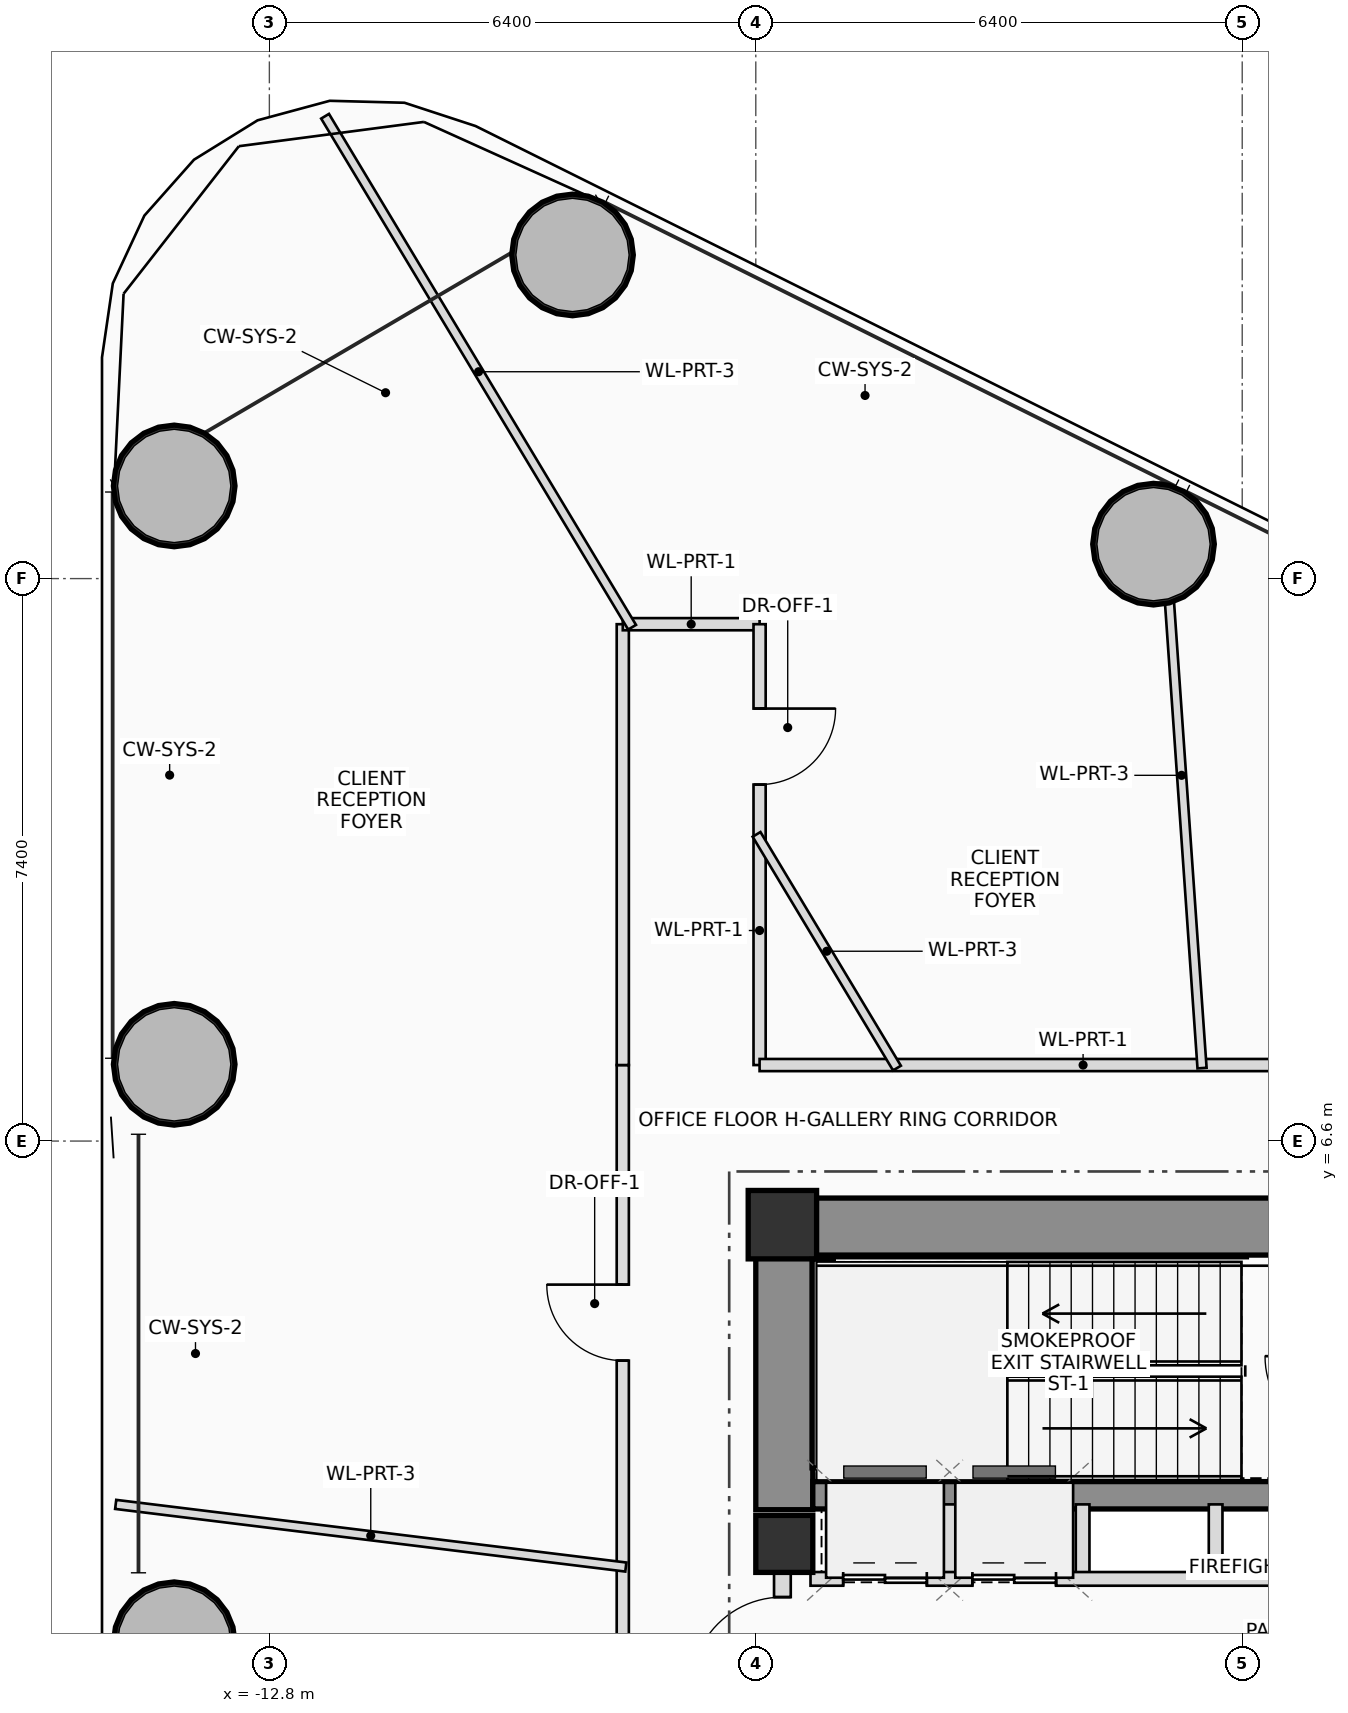
"""IFC4 building model, lengths in metres.
Left out: names, types, materials, properties, quantities, classifications, styles, units other than length and angle.
Written with IfcOpenShell. Run it as: python <this file> out.ifc"""

import sys

from ifc_helpers import new_model, si_unit, direction, frame, frame_2d, origin, origin_2d, place, context, subcontext, project, spatial, rectangle, hollow_circle, extrude, source, transform, mapped, element, fill, save


model = new_model("IFC4")
c1 = context("Model", 3, precision=1e-05, world=origin(), true_north=direction((0.0, 1.0)))
c2 = subcontext(c1, "Body", "Model", "MODEL_VIEW")
j1 = project(units=[si_unit("LENGTHUNIT", "METRE"), si_unit("PLANEANGLEUNIT", "RADIAN")], contexts=[c1])
p1 = place(None, origin())
s1 = spatial("IfcSite", under=j1, at=p1, CompositionType="ELEMENT")
p2 = place(p1, origin())
s2 = spatial("IfcBuilding", under=s1, at=p2, CompositionType="ELEMENT")
p3 = place(p2, frame((0.0, 0.0, 46.0)))
s3 = spatial("IfcBuildingStorey", under=s2, at=p3, CompositionType="ELEMENT", Elevation=46.0)
m1 = source(origin(), c2, "Body", "SweptSolid", [
    extrude(rectangle(XDim=0.9, YDim=0.9, at=origin_2d()), origin(), (0.0, 0.0, 1.0), 3.7),
])
p4 = place(p3, frame((-6.05, 5.5, 0.0), z_axis=(0.0, 0.0, 1.0), x_axis=(1.0, 0.0, 0.0)))
e1 = element("IfcColumn", 1, at=p4, inside=s3, PredefinedType="COLUMN", context=c2, shape_type="MappedRepresentation", body=[
    mapped(m1, transform((0.0, 0.0, 0.0), scale=1.0)),
])
p5 = place(p3, frame((-6.4, 5.475, 0.0), z_axis=(0.0, 0.0, 1.0), x_axis=(1.0, 0.0, 0.0)))
e2 = element("IfcWall", 2, at=p5, inside=s3, PredefinedType="SHEAR", context=c2, shape_type="SweptSolid", body=[
    extrude(rectangle(XDim=12.8, YDim=0.75, at=frame_2d((6.4, 0.0))), origin(), (0.0, 0.0, 1.0), 3.7),
])
p6 = place(p5, frame((8.6, 0.0, 0.0)))
e3 = element("IfcOpeningElement", 3, at=p6, cuts=e2, PredefinedType="OPENING", context=c2, shape_type="SweptSolid", body=[
    extrude(rectangle(XDim=1.2, YDim=2.2, at=frame_2d((0.6, 1.1))), frame((0.0, 0.385, 0.0), z_axis=(0.0, -1.0, 0.0), x_axis=(1.0, 0.0, 0.0)), (0.0, 0.0, 1.0), 0.77),
])
p7 = place(p3, frame((-6.025, 1.75, 0.0), z_axis=(0.0, 0.0, 1.0), x_axis=(0.0, 1.0, 0.0)))
e4 = element("IfcWall", 4, at=p7, inside=s3, PredefinedType="SHEAR", context=c2, shape_type="SweptSolid", body=[
    extrude(rectangle(XDim=3.35, YDim=0.75, at=frame_2d((1.675, 0.0))), origin(), (0.0, 0.0, 1.0), 3.7),
])
p8 = place(p3, frame((-5.65, 1.94, 0.0), z_axis=(0.0, 0.0, 1.0), x_axis=(1.0, 0.0, 0.0)))
e5 = element("IfcWall", 5, at=p8, inside=s3, PredefinedType="SHEAR", context=c2, shape_type="SweptSolid", body=[
    extrude(rectangle(XDim=11.3, YDim=0.36, at=frame_2d((5.65, 0.0))), origin(), (0.0, 0.0, 1.0), 3.7),
])
p9 = place(p3, frame((-5.52, 2.3, 0.0), z_axis=(0.0, 0.0, 1.0), x_axis=(0.0, 1.0, 0.0)))
e6 = element("IfcWall", 6, at=p9, inside=s3, PredefinedType="SHEAR", context=c2, shape_type="SweptSolid", body=[
    extrude(rectangle(XDim=2.75, YDim=0.28, at=frame_2d((1.375, 0.0))), origin(), (0.0, 0.0, 1.0), 3.7),
])
m2 = source(origin(), c2, "Body", "SweptSolid", [
    extrude(rectangle(XDim=0.75, YDim=0.75, at=origin_2d()), origin(), (0.0, 0.0, 1.0), 3.7),
])
p10 = place(p3, frame((-6.025, 1.3, 0.0), z_axis=(0.0, 0.0, 1.0), x_axis=(1.0, 0.0, 0.0)))
e7 = element("IfcColumn", 7, at=p10, inside=s3, PredefinedType="COLUMN", context=c2, shape_type="MappedRepresentation", body=[
    mapped(m2, transform((0.0, 0.0, 0.0), scale=1.0)),
])
m3 = source(origin(), c2, "Body", "SweptSolid", [
    extrude(hollow_circle(Radius=0.8, WallThickness=0.055, at=origin_2d()), origin(), (0.0, 0.0, 1.0), 3.7),
])
for number, where, z_axis, x_axis in (
    (8, (-1.167, 14.453, 0.0), (0.0, 0.0, 1.0), (1.0, 0.0, 0.0)),
    (9, (-8.812, 18.258, 0.0), (0.0, 0.0, 1.0), (1.0, 0.0, 0.0)),
    (10, (-14.052, 15.219, 0.0), (0.0, 0.0, 1.0), (1.0, 0.0, 0.0)),
    (11, (-14.052, 7.61, 0.0), (0.0, 0.0, 1.0), (1.0, 0.0, 0.0)),
    (12, (-14.052, 0.0, 0.0), (0.0, 0.0, 1.0), (1.0, 0.0, 0.0)),
):
    element("IfcColumn", number, at=place(p3, frame(where, z_axis=z_axis, x_axis=x_axis)), inside=s3, PredefinedType="COLUMN", context=c2, shape_type="MappedRepresentation", body=[
        mapped(m3, transform((0.0, 0.0, 0.0), scale=1.0)),
    ])
p11 = place(p3, frame((-6.05, -0.95, 0.0), z_axis=(0.0, 0.0, 1.0), x_axis=(0.0, 1.0, 0.0)))
e13 = element("IfcWall", 13, at=p11, inside=s3, PredefinedType="PLUMBINGWALL", context=c2, shape_type="SweptSolid", body=[
    extrude(rectangle(XDim=1.9, YDim=0.22, at=frame_2d((0.95, 0.0))), origin(), (0.0, 0.0, 1.0), 2.44),
])
p12 = place(p11, frame((0.35, 0.0, 0.0)))
e14 = element("IfcOpeningElement", 14, at=p12, cuts=e13, PredefinedType="OPENING", context=c2, shape_type="SweptSolid", body=[
    extrude(rectangle(XDim=1.2, YDim=2.2, at=frame_2d((0.6, 1.1))), frame((0.0, 0.12, 0.0), z_axis=(0.0, -1.0, 0.0), x_axis=(1.0, 0.0, 0.0)), (0.0, 0.0, 1.0), 0.24),
])
for number, where, z_axis, x_axis in (
    (15, (-3.85, 0.84, 0.0), (0.0, 0.0, 1.0), (0.0, 1.0, 0.0)),
    (16, (-2.1, 0.84, 0.0), (0.0, 0.0, 1.0), (0.0, 1.0, 0.0)),
    (17, (-0.35, 0.84, 0.0), (0.0, 0.0, 1.0), (0.0, 1.0, 0.0)),
):
    element("IfcWall", number, at=place(p3, frame(where, z_axis=z_axis, x_axis=x_axis)), inside=s3, PredefinedType="PLUMBINGWALL", context=c2, shape_type="SweptSolid", body=[
        extrude(rectangle(XDim=0.98, YDim=0.18, at=frame_2d((0.49, 0.0))), origin(), (0.0, 0.0, 1.0), 3.46),
    ])
p13 = place(p3, frame((-5.68, 0.84, 0.0), z_axis=(0.0, 0.0, 1.0), x_axis=(1.0, 0.0, 0.0)))
e18 = element("IfcWall", 18, at=p13, inside=s3, PredefinedType="PLUMBINGWALL", context=c2, shape_type="SweptSolid", body=[
    extrude(rectangle(XDim=11.33, YDim=0.18, at=frame_2d((5.665, 0.0))), origin(), (0.0, 0.0, 1.0), 3.46),
])
p14 = place(p13, frame((0.43, 0.0, 0.0)))
e19 = element("IfcOpeningElement", 19, at=p14, cuts=e18, PredefinedType="OPENING", context=c2, shape_type="SweptSolid", body=[
    extrude(rectangle(XDim=1.1, YDim=2.2, at=frame_2d((0.55, 1.1))), frame((0.0, 0.1, 0.0), z_axis=(0.0, -1.0, 0.0), x_axis=(1.0, 0.0, 0.0)), (0.0, 0.0, 1.0), 0.2),
])
p15 = place(p13, frame((2.13, 0.0, 0.0)))
e20 = element("IfcOpeningElement", 20, at=p15, cuts=e18, PredefinedType="OPENING", context=c2, shape_type="SweptSolid", body=[
    extrude(rectangle(XDim=1.1, YDim=2.2, at=frame_2d((0.55, 1.1))), frame((0.0, 0.1, 0.0), z_axis=(0.0, -1.0, 0.0), x_axis=(1.0, 0.0, 0.0)), (0.0, 0.0, 1.0), 0.2),
])
p16 = place(p13, frame((10.25, 0.0, 0.0)))
e21 = element("IfcOpeningElement", 21, at=p16, cuts=e18, PredefinedType="OPENING", context=c2, shape_type="SweptSolid", body=[
    extrude(rectangle(XDim=0.9, YDim=2.05, at=frame_2d((0.45, 1.025))), frame((0.0, 0.1, 0.0), z_axis=(0.0, -1.0, 0.0), x_axis=(1.0, 0.0, 0.0)), (0.0, 0.0, 1.0), 0.2),
])
p17 = place(p3, frame((-8.15, -7.6, 0.0), z_axis=(0.0, 0.0, 1.0), x_axis=(0.0, 1.0, 0.0)))
e22 = element("IfcWall", 22, at=p17, inside=s3, PredefinedType="PARTITIONING", context=c2, shape_type="SweptSolid", body=[
    extrude(rectangle(XDim=15.2, YDim=0.16, at=frame_2d((7.6, 0.0))), origin(), (0.0, 0.0, 1.0), 2.765),
])
p18 = place(p17, frame((6.109, 0.0, 0.0)))
e23 = element("IfcOpeningElement", 23, at=p18, cuts=e22, PredefinedType="OPENING", context=c2, shape_type="SweptSolid", body=[
    extrude(rectangle(XDim=1.0, YDim=2.25, at=frame_2d((0.5, 1.125))), frame((0.0, 0.09, 0.0), z_axis=(0.0, -1.0, 0.0), x_axis=(1.0, 0.0, 0.0)), (0.0, 0.0, 1.0), 0.18),
])
p19 = place(p17, frame((11.312, 0.0, 0.0)))
e24 = element("IfcOpeningElement", 24, at=p19, cuts=e22, PredefinedType="OPENING", context=c2, shape_type="SweptSolid", body=[
    extrude(rectangle(XDim=1.0, YDim=2.25, at=frame_2d((0.5, 1.125))), frame((0.0, 0.09, 0.0), z_axis=(0.0, -1.0, 0.0), x_axis=(1.0, 0.0, 0.0)), (0.0, 0.0, 1.0), 0.18),
])
p20 = place(p3, frame((-8.15, 7.6, 0.0), z_axis=(0.0, 0.0, 1.0), x_axis=(0.0, 1.0, 0.0)))
e25 = element("IfcWall", 25, at=p20, inside=s3, PredefinedType="PARTITIONING", context=c2, shape_type="SweptSolid", body=[
    extrude(rectangle(XDim=5.8, YDim=0.16, at=frame_2d((2.9, 0.0))), origin(), (0.0, 0.0, 1.0), 2.765),
])
p21 = place(p3, frame((-8.15, 13.4, 0.0), z_axis=(0.0, 0.0, 1.0), x_axis=(1.0, 0.0, 0.0)))
e26 = element("IfcWall", 26, at=p21, inside=s3, PredefinedType="PARTITIONING", context=c2, shape_type="SweptSolid", body=[
    extrude(rectangle(XDim=1.8, YDim=0.16, at=frame_2d((0.9, 0.0))), origin(), (0.0, 0.0, 1.0), 2.765),
])
p22 = place(p3, frame((-6.35, 13.4, 0.0), z_axis=(0.0, 0.0, 1.0), x_axis=(0.0, -1.0, 0.0)))
e27 = element("IfcWall", 27, at=p22, inside=s3, PredefinedType="PARTITIONING", context=c2, shape_type="SweptSolid", body=[
    extrude(rectangle(XDim=5.8, YDim=0.16, at=frame_2d((2.9, 0.0))), origin(), (0.0, 0.0, 1.0), 2.765),
])
p23 = place(p22, frame((1.11, 0.0, 0.0)))
e28 = element("IfcOpeningElement", 28, at=p23, cuts=e27, PredefinedType="OPENING", context=c2, shape_type="SweptSolid", body=[
    extrude(rectangle(XDim=1.0, YDim=2.25, at=frame_2d((0.5, 1.125))), frame((0.0, 0.09, 0.0), z_axis=(0.0, -1.0, 0.0), x_axis=(1.0, 0.0, 0.0)), (0.0, 0.0, 1.0), 0.18),
])
p24 = place(p3, frame((-6.35, 7.6, 0.0), z_axis=(0.0, 0.0, 1.0), x_axis=(1.0, 0.0, 0.0)))
e29 = element("IfcWall", 29, at=p24, inside=s3, PredefinedType="PARTITIONING", context=c2, shape_type="SweptSolid", body=[
    extrude(rectangle(XDim=12.7, YDim=0.16, at=frame_2d((6.35, 0.0))), origin(), (0.0, 0.0, 1.0), 2.765),
])
p25 = place(p24, frame((8.663, 0.0, 0.0)))
e30 = element("IfcOpeningElement", 30, at=p25, cuts=e29, PredefinedType="OPENING", context=c2, shape_type="SweptSolid", body=[
    extrude(rectangle(XDim=1.0, YDim=2.25, at=frame_2d((0.5, 1.125))), frame((0.0, 0.09, 0.0), z_axis=(0.0, -1.0, 0.0), x_axis=(1.0, 0.0, 0.0)), (0.0, 0.0, 1.0), 0.18),
])
p26 = place(p3, frame((-0.529, 7.56, 0.0), z_axis=(0.0, 0.0, 1.0), x_axis=(-0.069775328769, 0.997562731609, 0.0)))
e31 = element("IfcWall", 31, at=p26, inside=s3, PredefinedType="PARTITIONING", context=c2, shape_type="SweptSolid", body=[
    extrude(rectangle(XDim=7.722, YDim=0.12, at=frame_2d((3.861, 0.0))), origin(), (0.0, 0.0, 1.0), 2.965),
])
p27 = place(p3, frame((-4.542, 7.56, 0.0), z_axis=(0.0, 0.0, 1.0), x_axis=(-0.515026141225, 0.85717447107, 0.0)))
e32 = element("IfcWall", 32, at=p27, inside=s3, PredefinedType="PARTITIONING", context=c2, shape_type="SweptSolid", body=[
    extrude(rectangle(XDim=3.587, YDim=0.12, at=frame_2d((1.793, 0.0))), origin(), (0.0, 0.0, 1.0), 2.765),
])
p28 = place(p3, frame((-8.028, 13.36, 0.0), z_axis=(0.0, 0.0, 1.0), x_axis=(-0.515031259007, 0.857171396073, 0.0)))
e33 = element("IfcWall", 33, at=p28, inside=s3, PredefinedType="PARTITIONING", context=c2, shape_type="SweptSolid", body=[
    extrude(rectangle(XDim=7.843, YDim=0.12, at=frame_2d((3.921, 0.0))), origin(), (0.0, 0.0, 1.0), 2.925),
])
p29 = place(p3, frame((-8.11, 0.996, 0.0), z_axis=(0.0, 0.0, 1.0), x_axis=(-0.992548741741, 0.121848246885, 0.0)))
e34 = element("IfcWall", 34, at=p29, inside=s3, PredefinedType="PARTITIONING", context=c2, shape_type="SweptSolid", body=[
    extrude(rectangle(XDim=6.762, YDim=0.12, at=frame_2d((3.381, 0.0))), origin(), (0.0, 0.0, 1.0), 2.925),
])
p30 = place(p12, origin())
e35 = element("IfcDoor", 35, at=p30, inside=s3, OperationType="SINGLE_SWING_LEFT", PredefinedType="DOOR", context=c2, shape_type="SweptSolid", body=[
    extrude(rectangle(XDim=1.2, YDim=2.2, at=frame_2d((0.6, 1.1))), frame((0.0, 0.025, 0.0), z_axis=(0.0, -1.0, 0.0), x_axis=(1.0, 0.0, 0.0)), (0.0, 0.0, 1.0), 0.05),
])
fill(e14, e35)
p31 = place(p14, origin())
e36 = element("IfcDoor", 36, at=p31, inside=s3, OperationType="DOUBLE_DOOR_SLIDING", PredefinedType="DOOR", context=c2, shape_type="SweptSolid", body=[
    extrude(rectangle(XDim=1.1, YDim=2.2, at=frame_2d((0.55, 1.1))), frame((0.0, 0.025, 0.0), z_axis=(0.0, -1.0, 0.0), x_axis=(1.0, 0.0, 0.0)), (0.0, 0.0, 1.0), 0.05),
])
fill(e19, e36)
p32 = place(p15, origin())
e37 = element("IfcDoor", 37, at=p32, inside=s3, OperationType="DOUBLE_DOOR_SLIDING", PredefinedType="DOOR", context=c2, shape_type="SweptSolid", body=[
    extrude(rectangle(XDim=1.1, YDim=2.2, at=frame_2d((0.55, 1.1))), frame((0.0, 0.025, 0.0), z_axis=(0.0, -1.0, 0.0), x_axis=(1.0, 0.0, 0.0)), (0.0, 0.0, 1.0), 0.05),
])
fill(e20, e37)
p33 = place(p19, origin())
e38 = element("IfcDoor", 38, at=p33, inside=s3, OperationType="SINGLE_SWING_RIGHT", PredefinedType="DOOR", context=c2, shape_type="SweptSolid", body=[
    extrude(rectangle(XDim=1.0, YDim=2.25, at=frame_2d((0.5, 1.125))), frame((0.0, 0.025, 0.0), z_axis=(0.0, -1.0, 0.0), x_axis=(1.0, 0.0, 0.0)), (0.0, 0.0, 1.0), 0.05),
])
fill(e24, e38)
p34 = place(p23, origin())
e39 = element("IfcDoor", 39, at=p34, inside=s3, OperationType="SINGLE_SWING_LEFT", PredefinedType="DOOR", context=c2, shape_type="SweptSolid", body=[
    extrude(rectangle(XDim=1.0, YDim=2.25, at=frame_2d((0.5, 1.125))), frame((0.0, 0.025, 0.0), z_axis=(0.0, -1.0, 0.0), x_axis=(1.0, 0.0, 0.0)), (0.0, 0.0, 1.0), 0.05),
])
fill(e28, e39)
save(model, sys.argv[1])
